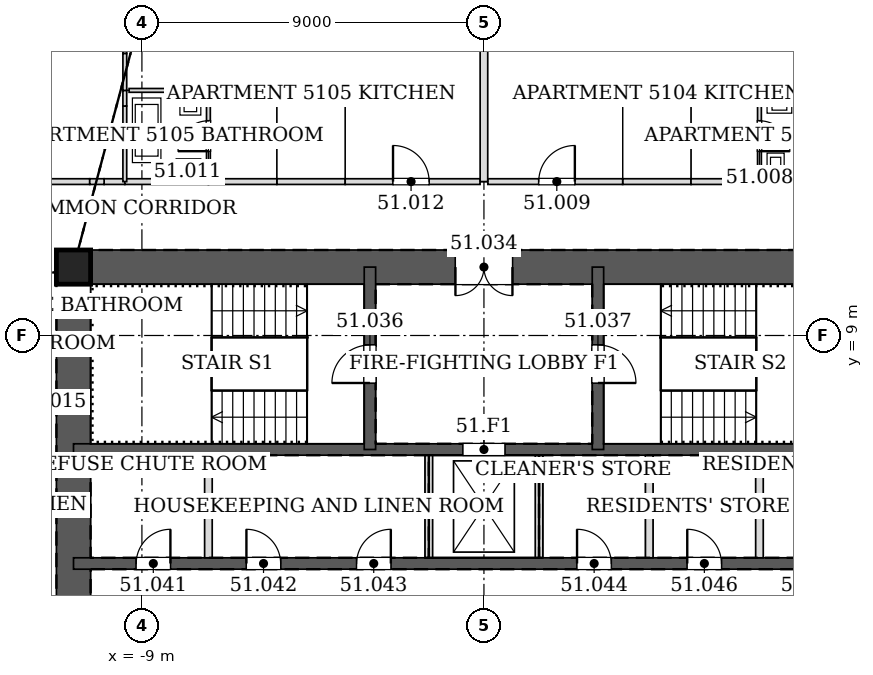
"""IFC4 building model, lengths in metres.
Left out: names, types, materials, properties, quantities, classifications, styles, units other than length and angle.
Written with IfcOpenShell. Run it as: python <this file> out.ifc"""

import sys

from ifc_helpers import new_model, si_unit, direction, frame, frame_2d, origin, origin_2d, place, context, subcontext, project, spatial, rectangle, hollow_rectangle, extrude, element, fill, save


model = new_model("IFC4")
c1 = context("Model", 3, precision=1e-05, world=origin(), true_north=direction((0.0, 1.0)))
c2 = subcontext(c1, "Body", "Model", "MODEL_VIEW")
j1 = project(units=[si_unit("LENGTHUNIT", "METRE"), si_unit("PLANEANGLEUNIT", "RADIAN")], contexts=[c1])
p1 = place(None, origin())
s1 = spatial("IfcSite", under=j1, at=p1, CompositionType="ELEMENT")
p2 = place(p1, origin())
s2 = spatial("IfcBuilding", under=s1, at=p2, CompositionType="ELEMENT")
p3 = place(p2, frame((0.0, 0.0, 221.0)))
s3 = spatial("IfcBuildingStorey", under=s2, at=p3, CompositionType="ELEMENT", Elevation=221.0)
p4 = place(p3, frame((-10.8, 10.8, 0.0), z_axis=(0.0, 0.0, 1.0), x_axis=(1.0, 0.0, 0.0)))
e1 = element("IfcColumn", 1, at=p4, inside=s3, PredefinedType="COLUMN", context=c2, shape_type="SweptSolid", body=[
    extrude(hollow_rectangle(XDim=0.9, YDim=0.9, WallThickness=0.05, at=origin_2d()), origin(), (0.0, 0.0, 1.0), 3.4),
])
p5 = place(p3, frame((10.8, 10.8, 0.0), z_axis=(0.0, 0.0, 1.0), x_axis=(-1.0, 0.0, 0.0)))
e2 = element("IfcWall", 2, at=p5, inside=s3, PredefinedType="SOLIDWALL", context=c2, shape_type="SweptSolid", body=[
    extrude(rectangle(XDim=21.6, YDim=0.9, at=frame_2d((10.8, 0.0))), origin(), (0.0, 0.0, 1.0), 3.4),
])
p6 = place(p5, frame((10.05, 0.0, 0.0)))
e3 = element("IfcOpeningElement", 3, at=p6, cuts=e2, PredefinedType="OPENING", context=c2, shape_type="SweptSolid", body=[
    extrude(rectangle(XDim=1.5, YDim=2.1, at=frame_2d((0.75, 1.05))), frame((0.0, 0.46, 0.0), z_axis=(0.0, -1.0, 0.0), x_axis=(1.0, 0.0, 0.0)), (0.0, 0.0, 1.0), 0.92),
])
p7 = place(p3, frame((-10.8, 10.8, 0.0), z_axis=(0.0, 0.0, 1.0), x_axis=(0.0, -1.0, 0.0)))
e4 = element("IfcWall", 4, at=p7, inside=s3, PredefinedType="SOLIDWALL", context=c2, shape_type="SweptSolid", body=[
    extrude(rectangle(XDim=21.6, YDim=0.9, at=frame_2d((10.8, 0.0))), origin(), (0.0, 0.0, 1.0), 3.4),
])
p8 = place(p7, frame((8.7, 0.0, 0.0)))
e5 = element("IfcOpeningElement", 5, at=p8, cuts=e4, PredefinedType="OPENING", context=c2, shape_type="SweptSolid", body=[
    extrude(rectangle(XDim=1.2, YDim=2.1, at=frame_2d((0.6, 1.05))), frame((0.0, 0.46, 0.0), z_axis=(0.0, -1.0, 0.0), x_axis=(1.0, 0.0, 0.0)), (0.0, 0.0, 1.0), 0.92),
])
p9 = place(p7, frame((11.7, 0.0, 0.0)))
e6 = element("IfcOpeningElement", 6, at=p9, cuts=e4, PredefinedType="OPENING", context=c2, shape_type="SweptSolid", body=[
    extrude(rectangle(XDim=1.2, YDim=2.1, at=frame_2d((0.6, 1.05))), frame((0.0, 0.46, 0.0), z_axis=(0.0, -1.0, 0.0), x_axis=(1.0, 0.0, 0.0)), (0.0, 0.0, 1.0), 0.92),
])
p10 = place(p3, frame((-10.8, 3.0, 0.0), z_axis=(0.0, 0.0, 1.0), x_axis=(1.0, 0.0, 0.0)))
e7 = element("IfcWall", 7, at=p10, inside=s3, PredefinedType="SOLIDWALL", context=c2, shape_type="SweptSolid", body=[
    extrude(rectangle(XDim=21.6, YDim=0.3, at=frame_2d((10.8, 0.0))), origin(), (0.0, 0.0, 1.0), 3.4),
])
p11 = place(p10, frame((1.65, 0.0, 0.0)))
e8 = element("IfcOpeningElement", 8, at=p11, cuts=e7, PredefinedType="OPENING", context=c2, shape_type="SweptSolid", body=[
    extrude(rectangle(XDim=0.9, YDim=2.1, at=frame_2d((0.45, 1.05))), frame((0.0, 0.16, 0.0), z_axis=(0.0, -1.0, 0.0), x_axis=(1.0, 0.0, 0.0)), (0.0, 0.0, 1.0), 0.32),
])
p12 = place(p10, frame((4.55, 0.0, 0.0)))
e9 = element("IfcOpeningElement", 9, at=p12, cuts=e7, PredefinedType="OPENING", context=c2, shape_type="SweptSolid", body=[
    extrude(rectangle(XDim=0.9, YDim=2.1, at=frame_2d((0.45, 1.05))), frame((0.0, 0.16, 0.0), z_axis=(0.0, -1.0, 0.0), x_axis=(1.0, 0.0, 0.0)), (0.0, 0.0, 1.0), 0.32),
])
p13 = place(p10, frame((7.45, 0.0, 0.0)))
e10 = element("IfcOpeningElement", 10, at=p13, cuts=e7, PredefinedType="OPENING", context=c2, shape_type="SweptSolid", body=[
    extrude(rectangle(XDim=0.9, YDim=2.1, at=frame_2d((0.45, 1.05))), frame((0.0, 0.16, 0.0), z_axis=(0.0, -1.0, 0.0), x_axis=(1.0, 0.0, 0.0)), (0.0, 0.0, 1.0), 0.32),
])
p14 = place(p10, frame((13.25, 0.0, 0.0)))
e11 = element("IfcOpeningElement", 11, at=p14, cuts=e7, PredefinedType="OPENING", context=c2, shape_type="SweptSolid", body=[
    extrude(rectangle(XDim=0.9, YDim=2.1, at=frame_2d((0.45, 1.05))), frame((0.0, 0.16, 0.0), z_axis=(0.0, -1.0, 0.0), x_axis=(1.0, 0.0, 0.0)), (0.0, 0.0, 1.0), 0.32),
])
p15 = place(p10, frame((16.15, 0.0, 0.0)))
e12 = element("IfcOpeningElement", 12, at=p15, cuts=e7, PredefinedType="OPENING", context=c2, shape_type="SweptSolid", body=[
    extrude(rectangle(XDim=0.9, YDim=2.1, at=frame_2d((0.45, 1.05))), frame((0.0, 0.16, 0.0), z_axis=(0.0, -1.0, 0.0), x_axis=(1.0, 0.0, 0.0)), (0.0, 0.0, 1.0), 0.32),
])
p16 = place(p10, frame((19.05, 0.0, 0.0)))
e13 = element("IfcOpeningElement", 13, at=p16, cuts=e7, PredefinedType="OPENING", context=c2, shape_type="SweptSolid", body=[
    extrude(rectangle(XDim=0.9, YDim=2.1, at=frame_2d((0.45, 1.05))), frame((0.0, 0.16, 0.0), z_axis=(0.0, -1.0, 0.0), x_axis=(1.0, 0.0, 0.0)), (0.0, 0.0, 1.0), 0.32),
])
p17 = place(p3, frame((-10.8, 6.0, 0.0), z_axis=(0.0, 0.0, 1.0), x_axis=(1.0, 0.0, 0.0)))
e14 = element("IfcWall", 14, at=p17, inside=s3, PredefinedType="SOLIDWALL", context=c2, shape_type="SweptSolid", body=[
    extrude(rectangle(XDim=21.6, YDim=0.3, at=frame_2d((10.8, 0.0))), origin(), (0.0, 0.0, 1.0), 3.4),
])
p18 = place(p17, frame((10.25, 0.0, 0.0)))
e15 = element("IfcOpeningElement", 15, at=p18, cuts=e14, PredefinedType="OPENING", context=c2, shape_type="SweptSolid", body=[
    extrude(rectangle(XDim=1.1, YDim=2.1, at=frame_2d((0.55, 1.05))), frame((0.0, 0.16, 0.0), z_axis=(0.0, -1.0, 0.0), x_axis=(1.0, 0.0, 0.0)), (0.0, 0.0, 1.0), 0.32),
])
p19 = place(p3, frame((-3.0, 6.0, 0.0), z_axis=(0.0, 0.0, 1.0), x_axis=(0.0, 1.0, 0.0)))
e16 = element("IfcWall", 16, at=p19, inside=s3, PredefinedType="SOLIDWALL", context=c2, shape_type="SweptSolid", body=[
    extrude(rectangle(XDim=4.8, YDim=0.3, at=frame_2d((2.4, 0.0))), origin(), (0.0, 0.0, 1.0), 3.4),
])
p20 = place(p19, frame((1.75, 0.0, 0.0)))
e17 = element("IfcOpeningElement", 17, at=p20, cuts=e16, PredefinedType="OPENING", context=c2, shape_type="SweptSolid", body=[
    extrude(rectangle(XDim=1.0, YDim=2.1, at=frame_2d((0.5, 1.05))), frame((0.0, 0.16, 0.0), z_axis=(0.0, -1.0, 0.0), x_axis=(1.0, 0.0, 0.0)), (0.0, 0.0, 1.0), 0.32),
])
p21 = place(p3, frame((3.0, 6.0, 0.0), z_axis=(0.0, 0.0, 1.0), x_axis=(0.0, 1.0, 0.0)))
e18 = element("IfcWall", 18, at=p21, inside=s3, PredefinedType="SOLIDWALL", context=c2, shape_type="SweptSolid", body=[
    extrude(rectangle(XDim=4.8, YDim=0.3, at=frame_2d((2.4, 0.0))), origin(), (0.0, 0.0, 1.0), 3.4),
])
p22 = place(p21, frame((1.75, 0.0, 0.0)))
e19 = element("IfcOpeningElement", 19, at=p22, cuts=e18, PredefinedType="OPENING", context=c2, shape_type="SweptSolid", body=[
    extrude(rectangle(XDim=1.0, YDim=2.1, at=frame_2d((0.5, 1.05))), frame((0.0, 0.16, 0.0), z_axis=(0.0, -1.0, 0.0), x_axis=(1.0, 0.0, 0.0)), (0.0, 0.0, 1.0), 0.32),
])
p23 = place(p3, frame((9.451, 13.05, 0.0), z_axis=(0.0, 0.0, 1.0), x_axis=(-1.0, 0.0, 0.0)))
e20 = element("IfcWall", 20, at=p23, inside=s3, PredefinedType="PARTITIONING", context=c2, shape_type="SweptSolid", body=[
    extrude(rectangle(XDim=2.202, YDim=0.15, at=frame_2d((1.101, 0.0))), origin(), (0.0, 0.0, 1.0), 3.2),
])
p24 = place(p3, frame((5.451, 13.05, 0.0), z_axis=(0.0, 0.0, 1.0), x_axis=(-1.0, 0.0, 0.0)))
e21 = element("IfcWall", 21, at=p24, inside=s3, PredefinedType="PARTITIONING", context=c2, shape_type="SweptSolid", body=[
    extrude(rectangle(XDim=1.802, YDim=0.15, at=frame_2d((0.901, 0.0))), origin(), (0.0, 0.0, 1.0), 3.2),
])
p25 = place(p3, frame((3.651, 13.05, 0.0), z_axis=(0.0, 0.0, 1.0), x_axis=(-1.0, 0.0, 0.0)))
e22 = element("IfcWall", 22, at=p25, inside=s3, PredefinedType="PARTITIONING", context=c2, shape_type="SweptSolid", body=[
    extrude(rectangle(XDim=3.549, YDim=0.15, at=frame_2d((1.774, 0.0))), origin(), (0.0, 0.0, 1.0), 3.2),
])
p26 = place(p25, frame((1.259, 0.0, 0.0)))
e23 = element("IfcOpeningElement", 23, at=p26, cuts=e22, PredefinedType="OPENING", context=c2, shape_type="SweptSolid", body=[
    extrude(rectangle(XDim=0.95, YDim=2.1, at=frame_2d((0.475, 1.05))), frame((0.0, 0.085, 0.0), z_axis=(0.0, -1.0, 0.0), x_axis=(1.0, 0.0, 0.0)), (0.0, 0.0, 1.0), 0.17),
])
p27 = place(p3, frame((7.251, 13.05, 0.0), z_axis=(0.0, 0.0, 1.0), x_axis=(-1.0, 0.0, 0.0)))
e24 = element("IfcWall", 24, at=p27, inside=s3, PredefinedType="PARTITIONING", context=c2, shape_type="SweptSolid", body=[
    extrude(rectangle(XDim=1.802, YDim=0.15, at=frame_2d((0.901, 0.0))), origin(), (0.0, 0.0, 1.0), 3.2),
])
p28 = place(p3, frame((-9.449, 13.05, 0.0), z_axis=(0.0, 0.0, 1.0), x_axis=(-1.0, 0.0, 0.0)))
e25 = element("IfcWall", 25, at=p28, inside=s3, PredefinedType="PARTITIONING", context=c2, shape_type="SweptSolid", body=[
    extrude(rectangle(XDim=0.546, YDim=0.15, at=frame_2d((0.273, 0.0))), origin(), (0.0, 0.0, 1.0), 3.2),
])
p29 = place(p3, frame((-10.373, 13.05, 0.0), z_axis=(0.0, 0.0, 1.0), x_axis=(-1.0, 0.0, 0.0)))
e26 = element("IfcWall", 26, at=p29, inside=s3, PredefinedType="PARTITIONING", context=c2, shape_type="SweptSolid", body=[
    extrude(rectangle(XDim=2.677, YDim=0.15, at=frame_2d((1.339, 0.0))), origin(), (0.0, 0.0, 1.0), 2.578),
])
p30 = place(p3, frame((-9.995, 13.05, 0.0), z_axis=(0.0, 0.0, 1.0), x_axis=(-1.0, 0.0, 0.0)))
e27 = element("IfcWall", 27, at=p30, inside=s3, PredefinedType="PARTITIONING", context=c2, shape_type="SweptSolid", body=[
    extrude(rectangle(XDim=0.378, YDim=0.15, at=frame_2d((0.189, 0.0))), origin(), (0.0, 0.0, 1.0), 2.268),
])
p31 = place(p3, frame((-7.249, 13.05, 0.0), z_axis=(0.0, 0.0, 1.0), x_axis=(-1.0, 0.0, 0.0)))
e28 = element("IfcWall", 28, at=p31, inside=s3, PredefinedType="PARTITIONING", context=c2, shape_type="SweptSolid", body=[
    extrude(rectangle(XDim=2.202, YDim=0.15, at=frame_2d((1.101, 0.0))), origin(), (0.0, 0.0, 1.0), 3.2),
])
for number, where, z_axis, x_axis in (
    (29, (-3.649, 13.05, 0.0), (0.0, 0.0, 1.0), (-1.0, 0.0, 0.0)),
    (30, (-5.449, 13.05, 0.0), (0.0, 0.0, 1.0), (-1.0, 0.0, 0.0)),
):
    element("IfcWall", number, at=place(p3, frame(where, z_axis=z_axis, x_axis=x_axis)), inside=s3, PredefinedType="PARTITIONING", context=c2, shape_type="SweptSolid", body=[
        extrude(rectangle(XDim=1.802, YDim=0.15, at=frame_2d((0.901, 0.0))), origin(), (0.0, 0.0, 1.0), 3.2),
    ])
p32 = place(p3, frame((-0.102, 13.05, 0.0), z_axis=(0.0, 0.0, 1.0), x_axis=(-1.0, 0.0, 0.0)))
e31 = element("IfcWall", 31, at=p32, inside=s3, PredefinedType="PARTITIONING", context=c2, shape_type="SweptSolid", body=[
    extrude(rectangle(XDim=3.549, YDim=0.15, at=frame_2d((1.774, 0.0))), origin(), (0.0, 0.0, 1.0), 3.2),
])
p33 = place(p32, frame((1.34, 0.0, 0.0)))
e32 = element("IfcOpeningElement", 32, at=p33, cuts=e31, PredefinedType="OPENING", context=c2, shape_type="SweptSolid", body=[
    extrude(rectangle(XDim=0.95, YDim=2.1, at=frame_2d((0.475, 1.05))), frame((0.0, 0.085, 0.0), z_axis=(0.0, -1.0, 0.0), x_axis=(1.0, 0.0, 0.0)), (0.0, 0.0, 1.0), 0.17),
])
p34 = place(p3, frame((9.337, 15.45, 0.0), z_axis=(0.0, 0.0, 1.0), x_axis=(-1.0, 0.0, 0.0)))
e33 = element("IfcWall", 33, at=p34, inside=s3, PredefinedType="PARTITIONING", context=c2, shape_type="SweptSolid", body=[
    extrude(rectangle(XDim=2.087, YDim=0.1, at=frame_2d((1.044, 0.0))), origin(), (0.0, 0.0, 1.0), 3.2),
])
p35 = place(p3, frame((7.25, 15.45, 0.0), z_axis=(0.0, 0.0, 1.0), x_axis=(0.0, -1.0, 0.0)))
e34 = element("IfcWall", 34, at=p35, inside=s3, PredefinedType="PARTITIONING", context=c2, shape_type="SweptSolid", body=[
    extrude(rectangle(XDim=2.4, YDim=0.1, at=frame_2d((1.2, 0.0))), origin(), (0.0, 0.0, 1.0), 2.591),
])
p36 = place(p35, frame((0.8, 0.0, 0.0)))
e35 = element("IfcOpeningElement", 35, at=p36, cuts=e34, PredefinedType="OPENING", context=c2, shape_type="SweptSolid", body=[
    extrude(rectangle(XDim=0.8, YDim=2.1, at=frame_2d((0.4, 1.05))), frame((0.0, 0.06, 0.0), z_axis=(0.0, -1.0, 0.0), x_axis=(1.0, 0.0, 0.0)), (0.0, 0.0, 1.0), 0.12),
])
p37 = place(p3, frame((0.0, 20.598, 0.0), z_axis=(0.0, 0.0, 1.0), x_axis=(0.0, -1.0, 0.0)))
e36 = element("IfcWall", 36, at=p37, inside=s3, PredefinedType="PARTITIONING", context=c2, shape_type="SweptSolid", body=[
    extrude(rectangle(XDim=7.548, YDim=0.2, at=frame_2d((3.774, 0.0))), origin(), (0.0, 0.0, 1.0), 2.253),
])
p38 = place(p3, frame((-9.45, 13.05, 0.0), z_axis=(0.0, 0.0, 1.0), x_axis=(0.0, 1.0, 0.0)))
e37 = element("IfcWall", 37, at=p38, inside=s3, PredefinedType="PARTITIONING", context=c2, shape_type="SweptSolid", body=[
    extrude(rectangle(XDim=1.989, YDim=0.1, at=frame_2d((0.994, 0.0))), origin(), (0.0, 0.0, 1.0), 2.591),
])
p39 = place(p3, frame((-9.45, 15.039, 0.0), z_axis=(0.0, 0.0, 1.0), x_axis=(0.0, 1.0, 0.0)))
e38 = element("IfcWall", 38, at=p39, inside=s3, PredefinedType="PARTITIONING", context=c2, shape_type="SweptSolid", body=[
    extrude(rectangle(XDim=0.412, YDim=0.1, at=frame_2d((0.206, 0.0))), origin(), (0.0, 0.0, 1.0), 2.268),
])
p40 = place(p3, frame((-9.45, 16.42, 0.0), z_axis=(0.0, 0.0, 1.0), x_axis=(0.0, 1.0, 0.0)))
e39 = element("IfcWall", 39, at=p40, inside=s3, PredefinedType="PARTITIONING", context=c2, shape_type="SweptSolid", body=[
    extrude(rectangle(XDim=4.886, YDim=0.1, at=frame_2d((2.443, 0.0))), origin(), (0.0, 0.0, 1.0), 2.784),
])
p41 = place(p40, frame((1.711, 0.0, 0.0)))
e40 = element("IfcOpeningElement", 40, at=p41, cuts=e39, PredefinedType="OPENING", context=c2, shape_type="SweptSolid", body=[
    extrude(rectangle(XDim=0.85, YDim=2.1, at=frame_2d((0.425, 1.05))), frame((0.0, 0.06, 0.0), z_axis=(0.0, -1.0, 0.0), x_axis=(1.0, 0.0, 0.0)), (0.0, 0.0, 1.0), 0.12),
])
p42 = place(p3, frame((-9.45, 15.449, 0.0), z_axis=(0.0, 0.0, 1.0), x_axis=(0.0, 1.0, 0.0)))
e41 = element("IfcWall", 41, at=p42, inside=s3, PredefinedType="PARTITIONING", context=c2, shape_type="SweptSolid", body=[
    extrude(rectangle(XDim=0.971, YDim=0.1, at=frame_2d((0.485, 0.0))), origin(), (0.0, 0.0, 1.0), 2.268),
])
p43 = place(p3, frame((-7.25, 13.05, 0.0), z_axis=(0.0, 0.0, 1.0), x_axis=(0.0, 1.0, 0.0)))
e42 = element("IfcWall", 42, at=p43, inside=s3, PredefinedType="PARTITIONING", context=c2, shape_type="SweptSolid", body=[
    extrude(rectangle(XDim=2.4, YDim=0.1, at=frame_2d((1.2, 0.0))), origin(), (0.0, 0.0, 1.0), 2.591),
])
p44 = place(p43, frame((0.8, 0.0, 0.0)))
e43 = element("IfcOpeningElement", 43, at=p44, cuts=e42, PredefinedType="OPENING", context=c2, shape_type="SweptSolid", body=[
    extrude(rectangle(XDim=0.8, YDim=2.1, at=frame_2d((0.4, 1.05))), frame((0.0, 0.06, 0.0), z_axis=(0.0, -1.0, 0.0), x_axis=(1.0, 0.0, 0.0)), (0.0, 0.0, 1.0), 0.12),
])
p45 = place(p3, frame((-7.25, 15.45, 0.0), z_axis=(0.0, 0.0, 1.0), x_axis=(-1.0, 0.0, 0.0)))
e44 = element("IfcWall", 44, at=p45, inside=s3, PredefinedType="PARTITIONING", context=c2, shape_type="SweptSolid", body=[
    extrude(rectangle(XDim=2.087, YDim=0.1, at=frame_2d((1.044, 0.0))), origin(), (0.0, 0.0, 1.0), 3.2),
])
for number, where, z_axis, x_axis in (
    (45, (-7.25, 3.15, 0.0), (0.0, 0.0, 1.0), (0.0, 1.0, 0.0)),
    (46, (-1.45, 3.15, 0.0), (0.0, 0.0, 1.0), (0.0, 1.0, 0.0)),
    (47, (1.45, 3.15, 0.0), (0.0, 0.0, 1.0), (0.0, 1.0, 0.0)),
    (48, (4.35, 3.15, 0.0), (0.0, 0.0, 1.0), (0.0, 1.0, 0.0)),
    (49, (7.25, 3.15, 0.0), (0.0, 0.0, 1.0), (0.0, 1.0, 0.0)),
):
    element("IfcWall", number, at=place(p3, frame(where, z_axis=z_axis, x_axis=x_axis)), inside=s3, PredefinedType="PARTITIONING", context=c2, shape_type="SweptSolid", body=[
        extrude(rectangle(XDim=2.7, YDim=0.2, at=frame_2d((1.35, 0.0))), origin(), (0.0, 0.0, 1.0), 3.2),
    ])
p46 = place(p36, origin())
e50 = element("IfcDoor", 50, at=p46, inside=s3, OperationType="SINGLE_SWING_RIGHT", PredefinedType="DOOR", context=c2, shape_type="SweptSolid", body=[
    extrude(rectangle(XDim=0.8, YDim=2.1, at=frame_2d((0.4, 1.05))), frame((0.0, 0.025, 0.0), z_axis=(0.0, -1.0, 0.0), x_axis=(1.0, 0.0, 0.0)), (0.0, 0.0, 1.0), 0.05),
])
fill(e35, e50)
p47 = place(p26, frame((0.95, 0.0, 0.0), z_axis=(0.0, 0.0, 1.0), x_axis=(-1.0, 0.0, 0.0)))
e51 = element("IfcDoor", 51, at=p47, inside=s3, OperationType="SINGLE_SWING_RIGHT", PredefinedType="DOOR", context=c2, shape_type="SweptSolid", body=[
    extrude(rectangle(XDim=0.95, YDim=2.1, at=frame_2d((0.475, 1.05))), frame((0.0, 0.025, 0.0), z_axis=(0.0, -1.0, 0.0), x_axis=(1.0, 0.0, 0.0)), (0.0, 0.0, 1.0), 0.05),
])
fill(e23, e51)
p48 = place(p44, origin())
e52 = element("IfcDoor", 52, at=p48, inside=s3, OperationType="SINGLE_SWING_LEFT", PredefinedType="DOOR", context=c2, shape_type="SweptSolid", body=[
    extrude(rectangle(XDim=0.8, YDim=2.1, at=frame_2d((0.4, 1.05))), frame((0.0, 0.025, 0.0), z_axis=(0.0, -1.0, 0.0), x_axis=(1.0, 0.0, 0.0)), (0.0, 0.0, 1.0), 0.05),
])
fill(e43, e52)
p49 = place(p33, frame((0.95, 0.0, 0.0), z_axis=(0.0, 0.0, 1.0), x_axis=(-1.0, 0.0, 0.0)))
e53 = element("IfcDoor", 53, at=p49, inside=s3, OperationType="SINGLE_SWING_LEFT", PredefinedType="DOOR", context=c2, shape_type="SweptSolid", body=[
    extrude(rectangle(XDim=0.95, YDim=2.1, at=frame_2d((0.475, 1.05))), frame((0.0, 0.025, 0.0), z_axis=(0.0, -1.0, 0.0), x_axis=(1.0, 0.0, 0.0)), (0.0, 0.0, 1.0), 0.05),
])
fill(e32, e53)
p50 = place(p6, origin())
e54 = element("IfcDoor", 54, at=p50, inside=s3, OperationType="DOUBLE_DOOR_SINGLE_SWING", PredefinedType="DOOR", context=c2, shape_type="SweptSolid", body=[
    extrude(rectangle(XDim=1.5, YDim=2.1, at=frame_2d((0.75, 1.05))), frame((0.0, 0.025, 0.0), z_axis=(0.0, -1.0, 0.0), x_axis=(1.0, 0.0, 0.0)), (0.0, 0.0, 1.0), 0.05),
])
fill(e3, e54)
p51 = place(p20, origin())
e55 = element("IfcDoor", 55, at=p51, inside=s3, OperationType="SINGLE_SWING_LEFT", PredefinedType="DOOR", context=c2, shape_type="SweptSolid", body=[
    extrude(rectangle(XDim=1.0, YDim=2.1, at=frame_2d((0.5, 1.05))), frame((0.0, 0.025, 0.0), z_axis=(0.0, -1.0, 0.0), x_axis=(1.0, 0.0, 0.0)), (0.0, 0.0, 1.0), 0.05),
])
fill(e17, e55)
p52 = place(p22, frame((1.0, 0.0, 0.0), z_axis=(0.0, 0.0, 1.0), x_axis=(-1.0, 0.0, 0.0)))
e56 = element("IfcDoor", 56, at=p52, inside=s3, OperationType="SINGLE_SWING_RIGHT", PredefinedType="DOOR", context=c2, shape_type="SweptSolid", body=[
    extrude(rectangle(XDim=1.0, YDim=2.1, at=frame_2d((0.5, 1.05))), frame((0.0, 0.025, 0.0), z_axis=(0.0, -1.0, 0.0), x_axis=(1.0, 0.0, 0.0)), (0.0, 0.0, 1.0), 0.05),
])
fill(e19, e56)
p53 = place(p11, origin())
e57 = element("IfcDoor", 57, at=p53, inside=s3, OperationType="SINGLE_SWING_RIGHT", PredefinedType="DOOR", context=c2, shape_type="SweptSolid", body=[
    extrude(rectangle(XDim=0.9, YDim=2.1, at=frame_2d((0.45, 1.05))), frame((0.0, 0.025, 0.0), z_axis=(0.0, -1.0, 0.0), x_axis=(1.0, 0.0, 0.0)), (0.0, 0.0, 1.0), 0.05),
])
fill(e8, e57)
p54 = place(p12, origin())
e58 = element("IfcDoor", 58, at=p54, inside=s3, OperationType="SINGLE_SWING_LEFT", PredefinedType="DOOR", context=c2, shape_type="SweptSolid", body=[
    extrude(rectangle(XDim=0.9, YDim=2.1, at=frame_2d((0.45, 1.05))), frame((0.0, 0.025, 0.0), z_axis=(0.0, -1.0, 0.0), x_axis=(1.0, 0.0, 0.0)), (0.0, 0.0, 1.0), 0.05),
])
fill(e9, e58)
p55 = place(p13, origin())
e59 = element("IfcDoor", 59, at=p55, inside=s3, OperationType="SINGLE_SWING_RIGHT", PredefinedType="DOOR", context=c2, shape_type="SweptSolid", body=[
    extrude(rectangle(XDim=0.9, YDim=2.1, at=frame_2d((0.45, 1.05))), frame((0.0, 0.025, 0.0), z_axis=(0.0, -1.0, 0.0), x_axis=(1.0, 0.0, 0.0)), (0.0, 0.0, 1.0), 0.05),
])
fill(e10, e59)
p56 = place(p14, origin())
e60 = element("IfcDoor", 60, at=p56, inside=s3, OperationType="SINGLE_SWING_LEFT", PredefinedType="DOOR", context=c2, shape_type="SweptSolid", body=[
    extrude(rectangle(XDim=0.9, YDim=2.1, at=frame_2d((0.45, 1.05))), frame((0.0, 0.025, 0.0), z_axis=(0.0, -1.0, 0.0), x_axis=(1.0, 0.0, 0.0)), (0.0, 0.0, 1.0), 0.05),
])
fill(e11, e60)
p57 = place(p15, origin())
e61 = element("IfcDoor", 61, at=p57, inside=s3, OperationType="SINGLE_SWING_LEFT", PredefinedType="DOOR", context=c2, shape_type="SweptSolid", body=[
    extrude(rectangle(XDim=0.9, YDim=2.1, at=frame_2d((0.45, 1.05))), frame((0.0, 0.025, 0.0), z_axis=(0.0, -1.0, 0.0), x_axis=(1.0, 0.0, 0.0)), (0.0, 0.0, 1.0), 0.05),
])
fill(e12, e61)
p58 = place(p18, origin())
e62 = element("IfcDoor", 62, at=p58, inside=s3, OperationType="DOUBLE_DOOR_SLIDING", PredefinedType="DOOR", context=c2, shape_type="SweptSolid", body=[
    extrude(rectangle(XDim=1.1, YDim=2.1, at=frame_2d((0.55, 1.05))), frame((0.0, 0.025, 0.0), z_axis=(0.0, -1.0, 0.0), x_axis=(1.0, 0.0, 0.0)), (0.0, 0.0, 1.0), 0.05),
])
fill(e15, e62)
save(model, sys.argv[1])
